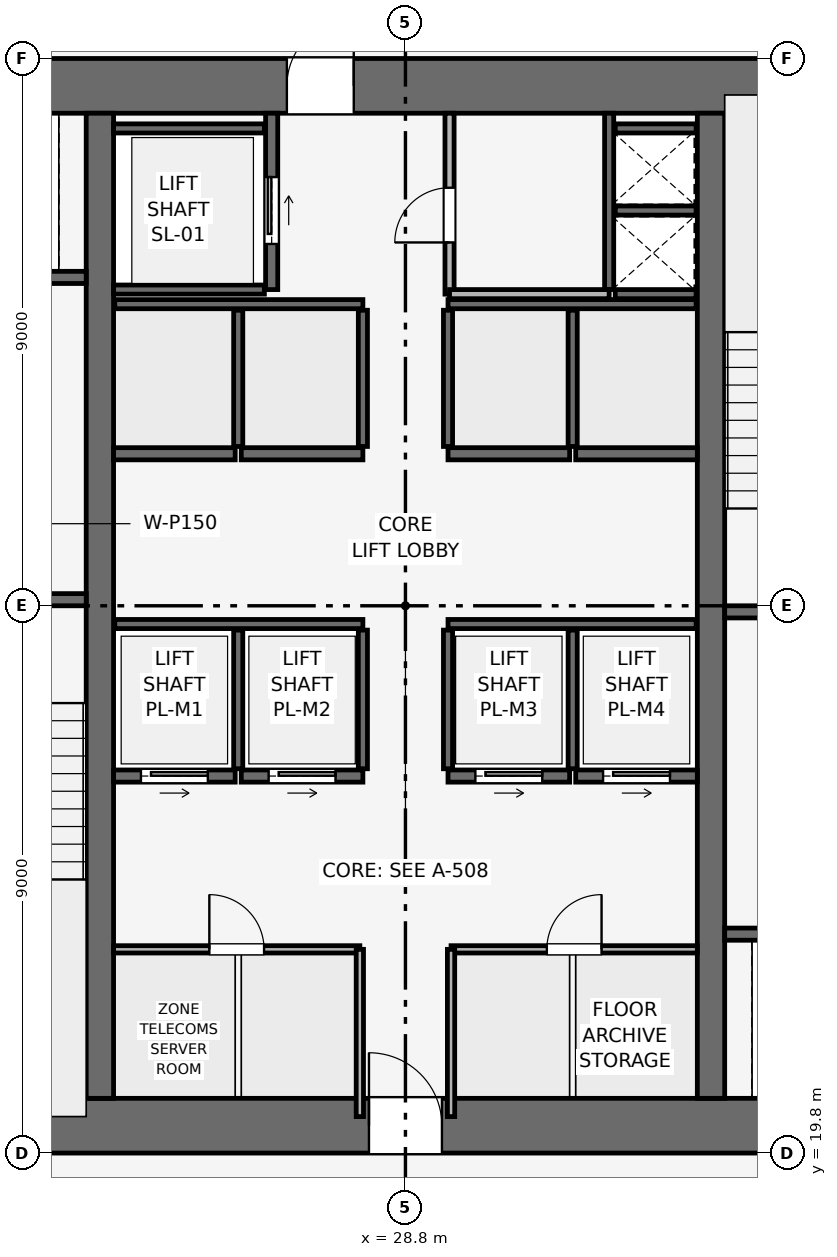
"""IFC4 building model, lengths in metres.
Left out: names, types, materials, properties, quantities, classifications, styles, units other than length and angle.
Written with IfcOpenShell. Run it as: python <this file> out.ifc"""

import sys

from ifc_helpers import new_model, si_unit, direction, frame, frame_2d, origin, place, context, subcontext, project, spatial, rectangle, extrude, element, fill, save


model = new_model("IFC4")
c1 = context("Model", 3, precision=1e-05, world=origin(), true_north=direction((0.0, 1.0)))
c2 = subcontext(c1, "Body", "Model", "MODEL_VIEW")
j1 = project(units=[si_unit("LENGTHUNIT", "METRE"), si_unit("PLANEANGLEUNIT", "RADIAN")], contexts=[c1])
p1 = place(None, origin())
s1 = spatial("IfcSite", under=j1, at=p1, CompositionType="ELEMENT")
p2 = place(p1, origin())
s2 = spatial("IfcBuilding", under=s1, at=p2, CompositionType="ELEMENT")
p3 = place(p2, frame((0.0, 0.0, 190.8)))
s3 = spatial("IfcBuildingStorey", under=s2, at=p3, CompositionType="ELEMENT", Elevation=190.8)
p4 = place(p3, frame((19.8, 20.25, 0.0), z_axis=(0.0, 0.0, 1.0), x_axis=(1.0, 0.0, 0.0)))
e1 = element("IfcWall", 1, at=p4, inside=s3, PredefinedType="SHEAR", context=c2, shape_type="SweptSolid", body=[
    extrude(rectangle(XDim=18.0, YDim=0.9, at=frame_2d((9.0, 0.0))), origin(), (0.0, 0.0, 1.0), 3.75),
])
p5 = place(p4, frame((8.4, 0.0, 0.0)))
e2 = element("IfcOpeningElement", 2, at=p5, cuts=e1, PredefinedType="OPENING", context=c2, shape_type="SweptSolid", body=[
    extrude(rectangle(XDim=1.2, YDim=2.2, at=frame_2d((0.6, 1.1))), frame((0.0, 0.46, 0.0), z_axis=(0.0, -1.0, 0.0), x_axis=(1.0, 0.0, 0.0)), (0.0, 0.0, 1.0), 0.92),
])
p6 = place(p3, frame((19.8, 37.35, 0.0), z_axis=(0.0, 0.0, 1.0), x_axis=(1.0, 0.0, 0.0)))
e3 = element("IfcWall", 3, at=p6, inside=s3, PredefinedType="SHEAR", context=c2, shape_type="SweptSolid", body=[
    extrude(rectangle(XDim=18.0, YDim=0.9, at=frame_2d((9.0, 0.0))), origin(), (0.0, 0.0, 1.0), 3.75),
])
p7 = place(p6, frame((7.05, 0.0, 0.0)))
e4 = element("IfcOpeningElement", 4, at=p7, cuts=e3, PredefinedType="OPENING", context=c2, shape_type="SweptSolid", body=[
    extrude(rectangle(XDim=1.1, YDim=2.15, at=frame_2d((0.55, 1.075))), frame((0.0, 0.46, 0.0), z_axis=(0.0, -1.0, 0.0), x_axis=(1.0, 0.0, 0.0)), (0.0, 0.0, 1.0), 0.92),
])
for number, where, z_axis, x_axis in (
    (5, (23.775, 20.7, 0.0), (0.0, 0.0, 1.0), (0.0, 1.0, 0.0)),
    (6, (33.825, 20.7, 0.0), (0.0, 0.0, 1.0), (0.0, 1.0, 0.0)),
):
    element("IfcWall", number, at=place(p3, frame(where, z_axis=z_axis, x_axis=x_axis)), inside=s3, PredefinedType="SHEAR", context=c2, shape_type="SweptSolid", body=[
        extrude(rectangle(XDim=16.2, YDim=0.45, at=frame_2d((8.1, 0.0))), origin(), (0.0, 0.0, 1.0), 3.75),
    ])
p8 = place(p3, frame((20.4, 28.9, 0.0), z_axis=(0.0, 0.0, 1.0), x_axis=(1.0, 0.0, 0.0)))
e7 = element("IfcWall", 7, at=p8, inside=s3, PredefinedType="SHEAR", context=c2, shape_type="SweptSolid", body=[
    extrude(rectangle(XDim=3.15, YDim=0.2, at=frame_2d((1.575, 0.0))), origin(), (0.0, 0.0, 1.0), 3.35),
])
p9 = place(p8, frame((0.8, 0.0, 0.0)))
e8 = element("IfcOpeningElement", 8, at=p9, cuts=e7, PredefinedType="OPENING", context=c2, shape_type="SweptSolid", body=[
    extrude(rectangle(XDim=1.0, YDim=2.1, at=frame_2d((0.5, 1.05))), frame((0.0, 0.11, 0.0), z_axis=(0.0, -1.0, 0.0), x_axis=(1.0, 0.0, 0.0)), (0.0, 0.0, 1.0), 0.22),
])
p10 = place(p3, frame((34.05, 28.7, 0.0), z_axis=(0.0, 0.0, 1.0), x_axis=(1.0, 0.0, 0.0)))
e9 = element("IfcWall", 9, at=p10, inside=s3, PredefinedType="SHEAR", context=c2, shape_type="SweptSolid", body=[
    extrude(rectangle(XDim=3.15, YDim=0.2, at=frame_2d((1.575, 0.0))), origin(), (0.0, 0.0, 1.0), 3.35),
])
p11 = place(p10, frame((0.8, 0.0, 0.0)))
e10 = element("IfcOpeningElement", 10, at=p11, cuts=e9, PredefinedType="OPENING", context=c2, shape_type="SweptSolid", body=[
    extrude(rectangle(XDim=1.0, YDim=2.1, at=frame_2d((0.5, 1.05))), frame((0.0, 0.11, 0.0), z_axis=(0.0, -1.0, 0.0), x_axis=(1.0, 0.0, 0.0)), (0.0, 0.0, 1.0), 0.22),
])
p12 = place(p3, frame((32.15, 34.0, 0.0), z_axis=(0.0, 0.0, 1.0), x_axis=(0.0, 1.0, 0.0)))
e11 = element("IfcWall", 11, at=p12, inside=s3, PredefinedType="SHEAR", context=c2, shape_type="SweptSolid", body=[
    extrude(rectangle(XDim=2.9, YDim=0.15, at=frame_2d((1.45, 0.0))), origin(), (0.0, 0.0, 1.0), 3.35),
])
for number, where, z_axis, x_axis in (
    (12, (32.25, 33.925, 0.0), (0.0, 0.0, 1.0), (1.0, 0.0, 0.0)),
    (13, (32.25, 35.3, 0.0), (0.0, 0.0, 1.0), (1.0, 0.0, 0.0)),
):
    element("IfcWall", number, at=place(p3, frame(where, z_axis=z_axis, x_axis=x_axis)), inside=s3, PredefinedType="SHEAR", context=c2, shape_type="SweptSolid", body=[
        extrude(rectangle(XDim=1.33, YDim=0.15, at=frame_2d((0.665, 0.0))), origin(), (0.0, 0.0, 1.0), 3.35),
    ])
p13 = place(p3, frame((20.5, 34.2, 0.0), z_axis=(0.0, 0.0, 1.0), x_axis=(1.0, 0.0, 0.0)))
e14 = element("IfcWall", 14, at=p13, inside=s3, PredefinedType="SHEAR", context=c2, shape_type="SweptSolid", body=[
    extrude(rectangle(XDim=3.05, YDim=0.2, at=frame_2d((1.525, 0.0))), origin(), (0.0, 0.0, 1.0), 3.35),
])
p14 = place(p13, frame((0.75, 0.0, 0.0)))
e15 = element("IfcOpeningElement", 15, at=p14, cuts=e14, PredefinedType="OPENING", context=c2, shape_type="SweptSolid", body=[
    extrude(rectangle(XDim=1.1, YDim=2.15, at=frame_2d((0.55, 1.075))), frame((0.0, 0.11, 0.0), z_axis=(0.0, -1.0, 0.0), x_axis=(1.0, 0.0, 0.0)), (0.0, 0.0, 1.0), 0.22),
])
p15 = place(p3, frame((34.05, 23.4, 0.0), z_axis=(0.0, 0.0, 1.0), x_axis=(1.0, 0.0, 0.0)))
e16 = element("IfcWall", 16, at=p15, inside=s3, PredefinedType="SHEAR", context=c2, shape_type="SweptSolid", body=[
    extrude(rectangle(XDim=3.05, YDim=0.2, at=frame_2d((1.525, 0.0))), origin(), (0.0, 0.0, 1.0), 3.35),
])
p16 = place(p15, frame((1.2, 0.0, 0.0)))
e17 = element("IfcOpeningElement", 17, at=p16, cuts=e16, PredefinedType="OPENING", context=c2, shape_type="SweptSolid", body=[
    extrude(rectangle(XDim=1.1, YDim=2.15, at=frame_2d((0.55, 1.075))), frame((0.0, 0.11, 0.0), z_axis=(0.0, -1.0, 0.0), x_axis=(1.0, 0.0, 0.0)), (0.0, 0.0, 1.0), 0.22),
])
p17 = place(p3, frame((26.6, 34.0, 0.0), z_axis=(0.0, 0.0, 1.0), x_axis=(0.0, 1.0, 0.0)))
e18 = element("IfcWall", 18, at=p17, inside=s3, PredefinedType="SHEAR", context=c2, shape_type="SweptSolid", body=[
    extrude(rectangle(XDim=2.9, YDim=0.2, at=frame_2d((1.45, 0.0))), origin(), (0.0, 0.0, 1.0), 3.35),
])
p18 = place(p17, frame((0.75, 0.0, 0.0)))
e19 = element("IfcOpeningElement", 19, at=p18, cuts=e18, PredefinedType="OPENING", context=c2, shape_type="SweptSolid", body=[
    extrude(rectangle(XDim=1.1, YDim=2.15, at=frame_2d((0.55, 1.075))), frame((0.0, 0.11, 0.0), z_axis=(0.0, -1.0, 0.0), x_axis=(1.0, 0.0, 0.0)), (0.0, 0.0, 1.0), 0.22),
])
for number, where, z_axis, x_axis in (
    (20, (24.0, 34.0, 0.0), (0.0, 0.0, 1.0), (1.0, 0.0, 0.0)),
    (21, (24.0, 36.65, 0.0), (0.0, 0.0, 1.0), (1.0, 0.0, 0.0)),
):
    element("IfcWall", number, at=place(p3, frame(where, z_axis=z_axis, x_axis=x_axis)), inside=s3, PredefinedType="SHEAR", context=c2, shape_type="SweptSolid", body=[
        extrude(rectangle(XDim=2.48, YDim=0.15, at=frame_2d((1.24, 0.0))), origin(), (0.0, 0.0, 1.0), 3.35),
    ])
p19 = place(p3, frame((24.0, 26.0, 0.0), z_axis=(0.0, 0.0, 1.0), x_axis=(1.0, 0.0, 0.0)))
e22 = element("IfcWall", 22, at=p19, inside=s3, PredefinedType="SHEAR", context=c2, shape_type="SweptSolid", body=[
    extrude(rectangle(XDim=2.0, YDim=0.2, at=frame_2d((1.0, 0.0))), origin(), (0.0, 0.0, 1.0), 3.35),
])
p20 = place(p19, frame((0.45, 0.0, 0.0)))
e23 = element("IfcOpeningElement", 23, at=p20, cuts=e22, PredefinedType="OPENING", context=c2, shape_type="SweptSolid", body=[
    extrude(rectangle(XDim=1.1, YDim=2.15, at=frame_2d((0.55, 1.075))), frame((0.0, 0.11, 0.0), z_axis=(0.0, -1.0, 0.0), x_axis=(1.0, 0.0, 0.0)), (0.0, 0.0, 1.0), 0.22),
])
p21 = place(p3, frame((26.1, 26.0, 0.0), z_axis=(0.0, 0.0, 1.0), x_axis=(1.0, 0.0, 0.0)))
e24 = element("IfcWall", 24, at=p21, inside=s3, PredefinedType="SHEAR", context=c2, shape_type="SweptSolid", body=[
    extrude(rectangle(XDim=2.0, YDim=0.2, at=frame_2d((1.0, 0.0))), origin(), (0.0, 0.0, 1.0), 3.35),
])
p22 = place(p21, frame((0.45, 0.0, 0.0)))
e25 = element("IfcOpeningElement", 25, at=p22, cuts=e24, PredefinedType="OPENING", context=c2, shape_type="SweptSolid", body=[
    extrude(rectangle(XDim=1.1, YDim=2.15, at=frame_2d((0.55, 1.075))), frame((0.0, 0.11, 0.0), z_axis=(0.0, -1.0, 0.0), x_axis=(1.0, 0.0, 0.0)), (0.0, 0.0, 1.0), 0.22),
])
p23 = place(p3, frame((29.5, 26.0, 0.0), z_axis=(0.0, 0.0, 1.0), x_axis=(1.0, 0.0, 0.0)))
e26 = element("IfcWall", 26, at=p23, inside=s3, PredefinedType="SHEAR", context=c2, shape_type="SweptSolid", body=[
    extrude(rectangle(XDim=2.0, YDim=0.2, at=frame_2d((1.0, 0.0))), origin(), (0.0, 0.0, 1.0), 3.35),
])
p24 = place(p23, frame((0.45, 0.0, 0.0)))
e27 = element("IfcOpeningElement", 27, at=p24, cuts=e26, PredefinedType="OPENING", context=c2, shape_type="SweptSolid", body=[
    extrude(rectangle(XDim=1.1, YDim=2.15, at=frame_2d((0.55, 1.075))), frame((0.0, 0.11, 0.0), z_axis=(0.0, -1.0, 0.0), x_axis=(1.0, 0.0, 0.0)), (0.0, 0.0, 1.0), 0.22),
])
p25 = place(p3, frame((31.6, 26.0, 0.0), z_axis=(0.0, 0.0, 1.0), x_axis=(1.0, 0.0, 0.0)))
e28 = element("IfcWall", 28, at=p25, inside=s3, PredefinedType="SHEAR", context=c2, shape_type="SweptSolid", body=[
    extrude(rectangle(XDim=2.0, YDim=0.2, at=frame_2d((1.0, 0.0))), origin(), (0.0, 0.0, 1.0), 3.35),
])
p26 = place(p25, frame((0.45, 0.0, 0.0)))
e29 = element("IfcOpeningElement", 29, at=p26, cuts=e28, PredefinedType="OPENING", context=c2, shape_type="SweptSolid", body=[
    extrude(rectangle(XDim=1.1, YDim=2.15, at=frame_2d((0.55, 1.075))), frame((0.0, 0.11, 0.0), z_axis=(0.0, -1.0, 0.0), x_axis=(1.0, 0.0, 0.0)), (0.0, 0.0, 1.0), 0.22),
])
for number, where, z_axis, x_axis in (
    (30, (24.0, 31.3, 0.0), (0.0, 0.0, 1.0), (1.0, 0.0, 0.0)),
    (31, (26.1, 31.3, 0.0), (0.0, 0.0, 1.0), (1.0, 0.0, 0.0)),
    (32, (29.5, 31.3, 0.0), (0.0, 0.0, 1.0), (1.0, 0.0, 0.0)),
    (33, (31.6, 31.3, 0.0), (0.0, 0.0, 1.0), (1.0, 0.0, 0.0)),
):
    element("IfcWall", number, at=place(p3, frame(where, z_axis=z_axis, x_axis=x_axis)), inside=s3, PredefinedType="SHEAR", context=c2, shape_type="SweptSolid", body=[
        extrude(rectangle(XDim=2.0, YDim=0.2, at=frame_2d((1.0, 0.0))), origin(), (0.0, 0.0, 1.0), 3.35),
    ])
p27 = place(p3, frame((32.25, 36.65, 0.0), z_axis=(0.0, 0.0, 1.0), x_axis=(1.0, 0.0, 0.0)))
e34 = element("IfcWall", 34, at=p27, inside=s3, PredefinedType="SHEAR", context=c2, shape_type="SweptSolid", body=[
    extrude(rectangle(XDim=1.33, YDim=0.15, at=frame_2d((0.665, 0.0))), origin(), (0.0, 0.0, 1.0), 3.35),
])
for number, where, z_axis, x_axis in (
    (35, (24.02, 28.5, 0.0), (0.0, 0.0, 1.0), (1.0, 0.0, 0.0)),
    (36, (29.5, 28.5, 0.0), (0.0, 0.0, 1.0), (1.0, 0.0, 0.0)),
):
    element("IfcWall", number, at=place(p3, frame(where, z_axis=z_axis, x_axis=x_axis)), inside=s3, PredefinedType="SHEAR", context=c2, shape_type="SweptSolid", body=[
        extrude(rectangle(XDim=4.08, YDim=0.15, at=frame_2d((2.04, 0.0))), origin(), (0.0, 0.0, 1.0), 3.35),
    ])
for number, where, z_axis, x_axis in (
    (37, (26.05, 26.12, 0.0), (0.0, 0.0, 1.0), (0.0, 1.0, 0.0)),
    (38, (28.1, 26.12, 0.0), (0.0, 0.0, 1.0), (0.0, 1.0, 0.0)),
    (39, (29.5, 26.12, 0.0), (0.0, 0.0, 1.0), (0.0, 1.0, 0.0)),
    (40, (31.55, 26.12, 0.0), (0.0, 0.0, 1.0), (0.0, 1.0, 0.0)),
):
    element("IfcWall", number, at=place(p3, frame(where, z_axis=z_axis, x_axis=x_axis)), inside=s3, PredefinedType="SHEAR", context=c2, shape_type="SweptSolid", body=[
        extrude(rectangle(XDim=2.28, YDim=0.15, at=frame_2d((1.14, 0.0))), origin(), (0.0, 0.0, 1.0), 3.35),
    ])
for number, where, z_axis, x_axis in (
    (41, (24.02, 33.76, 0.0), (0.0, 0.0, 1.0), (1.0, 0.0, 0.0)),
    (42, (29.5, 33.76, 0.0), (0.0, 0.0, 1.0), (1.0, 0.0, 0.0)),
):
    element("IfcWall", number, at=place(p3, frame(where, z_axis=z_axis, x_axis=x_axis)), inside=s3, PredefinedType="SHEAR", context=c2, shape_type="SweptSolid", body=[
        extrude(rectangle(XDim=4.08, YDim=0.15, at=frame_2d((2.04, 0.0))), origin(), (0.0, 0.0, 1.0), 3.35),
    ])
for number, where, z_axis, x_axis in (
    (43, (26.05, 31.42, 0.0), (0.0, 0.0, 1.0), (0.0, 1.0, 0.0)),
    (44, (28.1, 31.42, 0.0), (0.0, 0.0, 1.0), (0.0, 1.0, 0.0)),
    (45, (29.5, 31.42, 0.0), (0.0, 0.0, 1.0), (0.0, 1.0, 0.0)),
    (46, (31.55, 31.42, 0.0), (0.0, 0.0, 1.0), (0.0, 1.0, 0.0)),
):
    element("IfcWall", number, at=place(p3, frame(where, z_axis=z_axis, x_axis=x_axis)), inside=s3, PredefinedType="SHEAR", context=c2, shape_type="SweptSolid", body=[
        extrude(rectangle(XDim=2.24, YDim=0.15, at=frame_2d((1.12, 0.0))), origin(), (0.0, 0.0, 1.0), 3.35),
    ])
p28 = place(p3, frame((29.525, 33.925, 0.0), z_axis=(0.0, 0.0, 1.0), x_axis=(0.0, 1.0, 0.0)))
e47 = element("IfcWall", 47, at=p28, inside=s3, PredefinedType="PARTITIONING", context=c2, shape_type="SweptSolid", body=[
    extrude(rectangle(XDim=2.975, YDim=0.15, at=frame_2d((1.487, 0.0))), origin(), (0.0, 0.0, 1.0), 3.35),
])
p29 = place(p28, frame((0.85, 0.0, 0.0)))
e48 = element("IfcOpeningElement", 48, at=p29, cuts=e47, PredefinedType="OPENING", context=c2, shape_type="SweptSolid", body=[
    extrude(rectangle(XDim=0.9, YDim=2.1, at=frame_2d((0.45, 1.05))), frame((0.0, 0.085, 0.0), z_axis=(0.0, -1.0, 0.0), x_axis=(1.0, 0.0, 0.0)), (0.0, 0.0, 1.0), 0.17),
])
p30 = place(p3, frame((29.525, 33.925, 0.0), z_axis=(0.0, 0.0, 1.0), x_axis=(1.0, 0.0, 0.0)))
e49 = element("IfcWall", 49, at=p30, inside=s3, PredefinedType="PARTITIONING", context=c2, shape_type="SweptSolid", body=[
    extrude(rectangle(XDim=2.625, YDim=0.15, at=frame_2d((1.312, 0.0))), origin(), (0.0, 0.0, 1.0), 3.35),
])
p31 = place(p3, frame((24.0, 23.15, 0.0), z_axis=(0.0, 0.0, 1.0), x_axis=(1.0, 0.0, 0.0)))
e50 = element("IfcWall", 50, at=p31, inside=s3, PredefinedType="PARTITIONING", context=c2, shape_type="SweptSolid", body=[
    extrude(rectangle(XDim=4.05, YDim=0.12, at=frame_2d((2.025, 0.0))), origin(), (0.0, 0.0, 1.0), 3.35),
])
p32 = place(p31, frame((1.575, 0.0, 0.0)))
e51 = element("IfcOpeningElement", 51, at=p32, cuts=e50, PredefinedType="OPENING", context=c2, shape_type="SweptSolid", body=[
    extrude(rectangle(XDim=0.9, YDim=2.1, at=frame_2d((0.45, 1.05))), frame((0.0, 0.07, 0.0), z_axis=(0.0, -1.0, 0.0), x_axis=(1.0, 0.0, 0.0)), (0.0, 0.0, 1.0), 0.14),
])
p33 = place(p3, frame((28.05, 20.4, 0.0), z_axis=(0.0, 0.0, 1.0), x_axis=(0.0, 1.0, 0.0)))
e52 = element("IfcWall", 52, at=p33, inside=s3, PredefinedType="PARTITIONING", context=c2, shape_type="SweptSolid", body=[
    extrude(rectangle(XDim=2.75, YDim=0.12, at=frame_2d((1.375, 0.0))), origin(), (0.0, 0.0, 1.0), 3.35),
])
p34 = place(p3, frame((29.55, 23.15, 0.0), z_axis=(0.0, 0.0, 1.0), x_axis=(1.0, 0.0, 0.0)))
e53 = element("IfcWall", 53, at=p34, inside=s3, PredefinedType="PARTITIONING", context=c2, shape_type="SweptSolid", body=[
    extrude(rectangle(XDim=4.05, YDim=0.12, at=frame_2d((2.025, 0.0))), origin(), (0.0, 0.0, 1.0), 3.35),
])
p35 = place(p34, frame((1.575, 0.0, 0.0)))
e54 = element("IfcOpeningElement", 54, at=p35, cuts=e53, PredefinedType="OPENING", context=c2, shape_type="SweptSolid", body=[
    extrude(rectangle(XDim=0.9, YDim=2.1, at=frame_2d((0.45, 1.05))), frame((0.0, 0.07, 0.0), z_axis=(0.0, -1.0, 0.0), x_axis=(1.0, 0.0, 0.0)), (0.0, 0.0, 1.0), 0.14),
])
p36 = place(p3, frame((29.55, 20.4, 0.0), z_axis=(0.0, 0.0, 1.0), x_axis=(0.0, 1.0, 0.0)))
e55 = element("IfcWall", 55, at=p36, inside=s3, PredefinedType="PARTITIONING", context=c2, shape_type="SweptSolid", body=[
    extrude(rectangle(XDim=2.75, YDim=0.12, at=frame_2d((1.375, 0.0))), origin(), (0.0, 0.0, 1.0), 3.35),
])
p37 = place(p18, origin())
e56 = element("IfcDoor", 56, at=p37, inside=s3, OperationType="SLIDING_TO_RIGHT", PredefinedType="DOOR", context=c2, shape_type="SweptSolid", body=[
    extrude(rectangle(XDim=1.1, YDim=2.15, at=frame_2d((0.55, 1.075))), frame((0.0, 0.025, 0.0), z_axis=(0.0, -1.0, 0.0), x_axis=(1.0, 0.0, 0.0)), (0.0, 0.0, 1.0), 0.05),
])
fill(e19, e56)
p38 = place(p20, origin())
e57 = element("IfcDoor", 57, at=p38, inside=s3, OperationType="SLIDING_TO_RIGHT", PredefinedType="DOOR", context=c2, shape_type="SweptSolid", body=[
    extrude(rectangle(XDim=1.1, YDim=2.15, at=frame_2d((0.55, 1.075))), frame((0.0, 0.025, 0.0), z_axis=(0.0, -1.0, 0.0), x_axis=(1.0, 0.0, 0.0)), (0.0, 0.0, 1.0), 0.05),
])
fill(e23, e57)
p39 = place(p22, origin())
e58 = element("IfcDoor", 58, at=p39, inside=s3, OperationType="SLIDING_TO_RIGHT", PredefinedType="DOOR", context=c2, shape_type="SweptSolid", body=[
    extrude(rectangle(XDim=1.1, YDim=2.15, at=frame_2d((0.55, 1.075))), frame((0.0, 0.025, 0.0), z_axis=(0.0, -1.0, 0.0), x_axis=(1.0, 0.0, 0.0)), (0.0, 0.0, 1.0), 0.05),
])
fill(e25, e58)
p40 = place(p24, origin())
e59 = element("IfcDoor", 59, at=p40, inside=s3, OperationType="SLIDING_TO_RIGHT", PredefinedType="DOOR", context=c2, shape_type="SweptSolid", body=[
    extrude(rectangle(XDim=1.1, YDim=2.15, at=frame_2d((0.55, 1.075))), frame((0.0, 0.025, 0.0), z_axis=(0.0, -1.0, 0.0), x_axis=(1.0, 0.0, 0.0)), (0.0, 0.0, 1.0), 0.05),
])
fill(e27, e59)
p41 = place(p26, origin())
e60 = element("IfcDoor", 60, at=p41, inside=s3, OperationType="SLIDING_TO_RIGHT", PredefinedType="DOOR", context=c2, shape_type="SweptSolid", body=[
    extrude(rectangle(XDim=1.1, YDim=2.15, at=frame_2d((0.55, 1.075))), frame((0.0, 0.025, 0.0), z_axis=(0.0, -1.0, 0.0), x_axis=(1.0, 0.0, 0.0)), (0.0, 0.0, 1.0), 0.05),
])
fill(e29, e60)
p42 = place(p29, origin())
e61 = element("IfcDoor", 61, at=p42, inside=s3, OperationType="SINGLE_SWING_LEFT", PredefinedType="DOOR", context=c2, shape_type="SweptSolid", body=[
    extrude(rectangle(XDim=0.9, YDim=2.1, at=frame_2d((0.45, 1.05))), frame((0.0, 0.025, 0.0), z_axis=(0.0, -1.0, 0.0), x_axis=(1.0, 0.0, 0.0)), (0.0, 0.0, 1.0), 0.05),
])
fill(e48, e61)
p43 = place(p32, origin())
e62 = element("IfcDoor", 62, at=p43, inside=s3, OperationType="SINGLE_SWING_LEFT", PredefinedType="DOOR", context=c2, shape_type="SweptSolid", body=[
    extrude(rectangle(XDim=0.9, YDim=2.1, at=frame_2d((0.45, 1.05))), frame((0.0, 0.025, 0.0), z_axis=(0.0, -1.0, 0.0), x_axis=(1.0, 0.0, 0.0)), (0.0, 0.0, 1.0), 0.05),
])
fill(e51, e62)
p44 = place(p35, origin())
e63 = element("IfcDoor", 63, at=p44, inside=s3, OperationType="SINGLE_SWING_RIGHT", PredefinedType="DOOR", context=c2, shape_type="SweptSolid", body=[
    extrude(rectangle(XDim=0.9, YDim=2.1, at=frame_2d((0.45, 1.05))), frame((0.0, 0.025, 0.0), z_axis=(0.0, -1.0, 0.0), x_axis=(1.0, 0.0, 0.0)), (0.0, 0.0, 1.0), 0.05),
])
fill(e54, e63)
p45 = place(p5, origin())
e64 = element("IfcDoor", 64, at=p45, inside=s3, OperationType="SINGLE_SWING_LEFT", PredefinedType="DOOR", context=c2, shape_type="SweptSolid", body=[
    extrude(rectangle(XDim=1.2, YDim=2.2, at=frame_2d((0.6, 1.1))), frame((0.0, 0.025, 0.0), z_axis=(0.0, -1.0, 0.0), x_axis=(1.0, 0.0, 0.0)), (0.0, 0.0, 1.0), 0.05),
])
fill(e2, e64)
p46 = place(p7, origin())
e65 = element("IfcDoor", 65, at=p46, inside=s3, OperationType="SINGLE_SWING_RIGHT", PredefinedType="DOOR", context=c2, shape_type="SweptSolid", body=[
    extrude(rectangle(XDim=1.1, YDim=2.15, at=frame_2d((0.55, 1.075))), frame((0.0, 0.025, 0.0), z_axis=(0.0, -1.0, 0.0), x_axis=(1.0, 0.0, 0.0)), (0.0, 0.0, 1.0), 0.05),
])
fill(e4, e65)
save(model, sys.argv[1])
